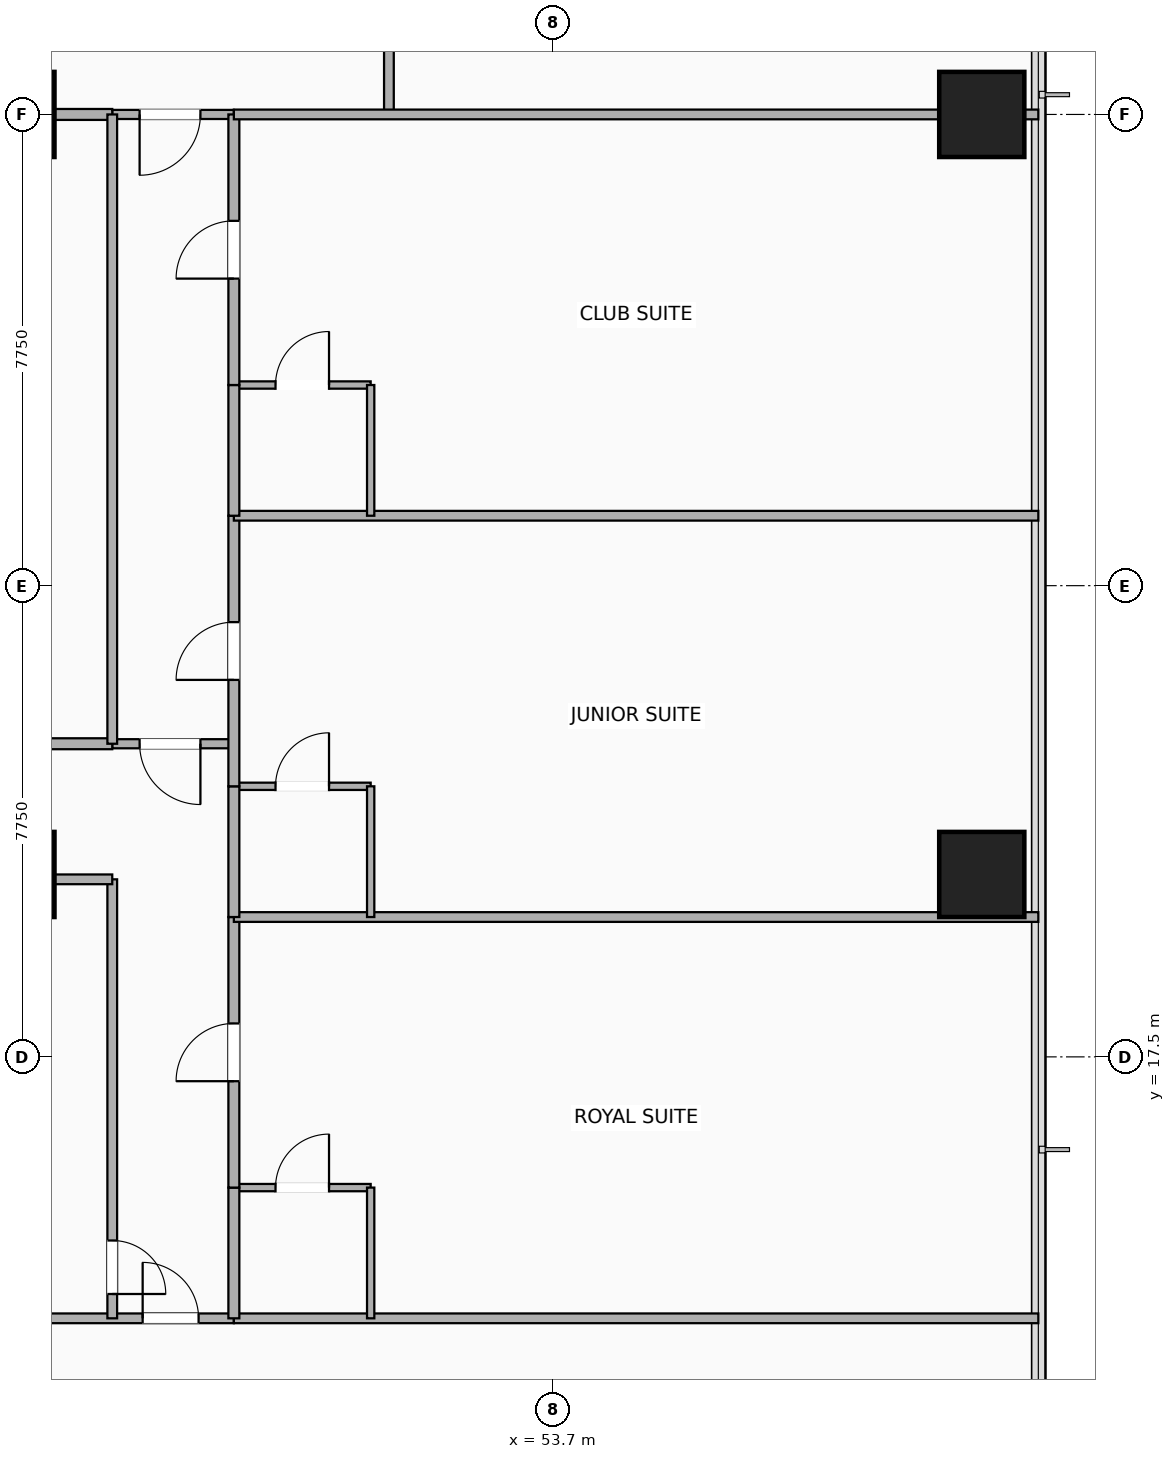
"""IFC4 building model, lengths in metres.
Left out: names, types, materials, properties, quantities, classifications, styles, units other than length and angle.
Written with IfcOpenShell. Run it as: python <this file> out.ifc"""

import sys

from ifc_helpers import new_model, si_unit, direction, frame, frame_2d, origin, origin_2d, place, context, subcontext, project, spatial, rectangle, extrude, element, fill, save


model = new_model("IFC4")
c1 = context("Model", 3, precision=1e-05, world=origin(), true_north=direction((0.0, 1.0)))
c2 = subcontext(c1, "Body", "Model", "MODEL_VIEW")
j1 = project(units=[si_unit("LENGTHUNIT", "METRE"), si_unit("PLANEANGLEUNIT", "RADIAN")], contexts=[c1])
p1 = place(None, origin())
s1 = spatial("IfcSite", under=j1, at=p1, CompositionType="ELEMENT")
p2 = place(p1, origin())
s2 = spatial("IfcBuilding", under=s1, at=p2, CompositionType="ELEMENT")
p3 = place(p2, frame((0.0, 0.0, 64.9)))
s3 = spatial("IfcBuildingStorey", under=s2, at=p3, CompositionType="ELEMENT", Elevation=64.9)
for number, where, z_axis, x_axis in (
    (1, (44.8, 20.5, -0.28), (0.0, 0.0, 1.0), (1.0, 0.0, 0.0)),
    (2, (44.8, 33.0, -0.28), (0.0, 0.0, 1.0), (1.0, 0.0, 0.0)),
    (3, (60.75, 20.5, -0.28), (0.0, 0.0, 1.0), (1.0, 0.0, 0.0)),
    (4, (60.75, 33.0, -0.28), (0.0, 0.0, 1.0), (1.0, 0.0, 0.0)),
):
    element("IfcColumn", number, at=place(p3, frame(where, z_axis=z_axis, x_axis=x_axis)), inside=s3, PredefinedType="COLUMN", context=c2, shape_type="SweptSolid", body=[
        extrude(rectangle(XDim=1.4, YDim=1.4, at=origin_2d()), origin(), (0.0, 0.0, 1.0), 3.5),
    ])
p4 = place(p3, frame((44.8, 13.2, 0.0), z_axis=(0.0, 0.0, 1.0), x_axis=(1.0, 0.0, 0.0)))
e5 = element("IfcWall", 5, at=p4, inside=s3, PredefinedType="PARTITIONING", context=c2, shape_type="SweptSolid", body=[
    extrude(rectangle(XDim=3.65, YDim=0.16, at=frame_2d((1.825, 0.0))), origin(), (0.0, 0.0, 1.0), 2.51),
])
p5 = place(p4, frame((3.07, 0.0, 0.0), z_axis=(0.0, 0.0, 1.0), x_axis=(-1.0, 0.0, 0.0)))
e6 = element("IfcOpeningElement", 6, at=p5, cuts=e5, PredefinedType="OPENING", context=c2, shape_type="SweptSolid", body=[
    extrude(rectangle(XDim=0.92, YDim=2.08, at=frame_2d((0.46, 1.04))), frame((0.0, 0.09, 0.0), z_axis=(0.0, -1.0, 0.0), x_axis=(1.0, 0.0, 0.0)), (0.0, 0.0, 1.0), 0.18),
])
p6 = place(p3, frame((46.45, 13.2, 0.0), z_axis=(0.0, 0.0, 1.0), x_axis=(0.0, 1.0, 0.0)))
e7 = element("IfcWall", 7, at=p6, inside=s3, PredefinedType="PARTITIONING", context=c2, shape_type="SweptSolid", body=[
    extrude(rectangle(XDim=7.22, YDim=0.16, at=frame_2d((3.61, 0.0))), origin(), (0.0, 0.0, 1.0), 2.51),
])
p7 = place(p6, frame((0.4, 0.0, 0.0)))
e8 = element("IfcOpeningElement", 8, at=p7, cuts=e7, PredefinedType="OPENING", context=c2, shape_type="SweptSolid", body=[
    extrude(rectangle(XDim=0.88, YDim=2.08, at=frame_2d((0.44, 1.04))), frame((0.0, 0.09, 0.0), z_axis=(0.0, -1.0, 0.0), x_axis=(1.0, 0.0, 0.0)), (0.0, 0.0, 1.0), 0.18),
])
p8 = place(p3, frame((44.8, 20.42, 0.0), z_axis=(0.0, 0.0, 1.0), x_axis=(1.0, 0.0, 0.0)))
e9 = element("IfcWall", 9, at=p8, inside=s3, PredefinedType="PARTITIONING", context=c2, shape_type="SweptSolid", body=[
    extrude(rectangle(XDim=1.65, YDim=0.16, at=frame_2d((0.825, 0.0))), origin(), (0.0, 0.0, 1.0), 2.51),
])
p9 = place(p3, frame((46.45, 22.65, 0.0), z_axis=(0.0, 0.0, 1.0), x_axis=(1.0, 0.0, 0.0)))
e10 = element("IfcWall", 10, at=p9, inside=s3, PredefinedType="PARTITIONING", context=c2, shape_type="SweptSolid", body=[
    extrude(rectangle(XDim=2.0, YDim=0.15, at=frame_2d((1.0, 0.0))), origin(), (0.0, 0.0, 1.0), 3.22),
])
p10 = place(p9, frame((0.45, 0.0, 0.0)))
e11 = element("IfcOpeningElement", 11, at=p10, cuts=e10, PredefinedType="OPENING", context=c2, shape_type="SweptSolid", body=[
    extrude(rectangle(XDim=1.0, YDim=2.15, at=frame_2d((0.5, 1.075))), frame((0.0, 0.085, 0.0), z_axis=(0.0, -1.0, 0.0), x_axis=(1.0, 0.0, 0.0)), (0.0, 0.0, 1.0), 0.17),
])
p11 = place(p3, frame((46.45, 33.0, 0.0), z_axis=(0.0, 0.0, 1.0), x_axis=(1.0, 0.0, 0.0)))
e12 = element("IfcWall", 12, at=p11, inside=s3, PredefinedType="PARTITIONING", context=c2, shape_type="SweptSolid", body=[
    extrude(rectangle(XDim=2.0, YDim=0.15, at=frame_2d((1.0, 0.0))), origin(), (0.0, 0.0, 1.0), 2.51),
])
p12 = place(p11, frame((0.45, 0.0, 0.0)))
e13 = element("IfcOpeningElement", 13, at=p12, cuts=e12, PredefinedType="OPENING", context=c2, shape_type="SweptSolid", body=[
    extrude(rectangle(XDim=1.0, YDim=2.15, at=frame_2d((0.5, 1.075))), frame((0.0, 0.085, 0.0), z_axis=(0.0, -1.0, 0.0), x_axis=(1.0, 0.0, 0.0)), (0.0, 0.0, 1.0), 0.17),
])
p13 = place(p3, frame((51.0, 33.0, 0.0), z_axis=(0.0, 0.0, 1.0), x_axis=(0.0, 1.0, 0.0)))
e14 = element("IfcWall", 14, at=p13, inside=s3, PredefinedType="PARTITIONING", context=c2, shape_type="SweptSolid", body=[
    extrude(rectangle(XDim=2.05, YDim=0.16, at=frame_2d((1.025, 0.0))), origin(), (0.0, 0.0, 1.0), 2.51),
])
p14 = place(p3, frame((24.1, 22.65, 0.0), z_axis=(0.0, 0.0, 1.0), x_axis=(1.0, 0.0, 0.0)))
e15 = element("IfcWall", 15, at=p14, inside=s3, PredefinedType="PARTITIONING", context=c2, shape_type="SweptSolid", body=[
    extrude(rectangle(XDim=22.35, YDim=0.18, at=frame_2d((11.175, 0.0))), origin(), (0.0, 0.0, 1.0), 2.51),
])
p15 = place(p14, frame((10.7, 0.0, 0.0)))
e16 = element("IfcOpeningElement", 16, at=p15, cuts=e15, PredefinedType="OPENING", context=c2, shape_type="SweptSolid", body=[
    extrude(rectangle(XDim=0.95, YDim=2.15, at=frame_2d((0.475, 1.075))), frame((0.0, 0.1, 0.0), z_axis=(0.0, -1.0, 0.0), x_axis=(1.0, 0.0, 0.0)), (0.0, 0.0, 1.0), 0.2),
])
p16 = place(p3, frame((24.1, 33.0, 0.0), z_axis=(0.0, 0.0, 1.0), x_axis=(1.0, 0.0, 0.0)))
e17 = element("IfcWall", 17, at=p16, inside=s3, PredefinedType="PARTITIONING", context=c2, shape_type="SweptSolid", body=[
    extrude(rectangle(XDim=22.35, YDim=0.18, at=frame_2d((11.175, 0.0))), origin(), (0.0, 0.0, 1.0), 2.51),
])
p17 = place(p3, frame((46.45, 22.65, 0.0), z_axis=(0.0, 0.0, 1.0), x_axis=(0.0, 1.0, 0.0)))
e18 = element("IfcWall", 18, at=p17, inside=s3, PredefinedType="PARTITIONING", context=c2, shape_type="SweptSolid", body=[
    extrude(rectangle(XDim=10.35, YDim=0.16, at=frame_2d((5.175, 0.0))), origin(), (0.0, 0.0, 1.0), 2.51),
])
p18 = place(p3, frame((48.45, 13.2, 0.0), z_axis=(0.0, 0.0, 1.0), x_axis=(1.0, 0.0, 0.0)))
e19 = element("IfcWall", 19, at=p18, inside=s3, PredefinedType="PARTITIONING", context=c2, shape_type="SweptSolid", body=[
    extrude(rectangle(XDim=13.23, YDim=0.16, at=frame_2d((6.615, 0.0))), origin(), (0.0, 0.0, 1.0), 2.583),
])
p19 = place(p3, frame((48.45, 15.35, 0.0), z_axis=(0.0, 0.0, 1.0), x_axis=(1.0, 0.0, 0.0)))
e20 = element("IfcWall", 20, at=p19, inside=s3, PredefinedType="PARTITIONING", context=c2, shape_type="SweptSolid", body=[
    extrude(rectangle(XDim=2.25, YDim=0.12, at=frame_2d((1.125, 0.0))), origin(), (0.0, 0.0, 1.0), 3.22),
])
p20 = place(p19, frame((1.565, 0.0, 0.0), z_axis=(0.0, 0.0, 1.0), x_axis=(-1.0, 0.0, 0.0)))
e21 = element("IfcOpeningElement", 21, at=p20, cuts=e20, PredefinedType="OPENING", context=c2, shape_type="SweptSolid", body=[
    extrude(rectangle(XDim=0.88, YDim=2.08, at=frame_2d((0.44, 1.04))), frame((0.0, 0.07, 0.0), z_axis=(0.0, -1.0, 0.0), x_axis=(1.0, 0.0, 0.0)), (0.0, 0.0, 1.0), 0.14),
])
p21 = place(p3, frame((50.7, 13.2, 0.0), z_axis=(0.0, 0.0, 1.0), x_axis=(0.0, 1.0, 0.0)))
e22 = element("IfcWall", 22, at=p21, inside=s3, PredefinedType="PARTITIONING", context=c2, shape_type="SweptSolid", body=[
    extrude(rectangle(XDim=2.15, YDim=0.12, at=frame_2d((1.075, 0.0))), origin(), (0.0, 0.0, 1.0), 2.902),
])
p22 = place(p3, frame((48.45, 13.2, 0.0), z_axis=(0.0, 0.0, 1.0), x_axis=(0.0, 1.0, 0.0)))
e23 = element("IfcWall", 23, at=p22, inside=s3, PredefinedType="PARTITIONING", context=c2, shape_type="SweptSolid", body=[
    extrude(rectangle(XDim=2.15, YDim=0.18, at=frame_2d((1.075, 0.0))), origin(), (0.0, 0.0, 1.0), 2.902),
])
p23 = place(p3, frame((48.45, 15.35, 0.0), z_axis=(0.0, 0.0, 1.0), x_axis=(0.0, 1.0, 0.0)))
e24 = element("IfcWall", 24, at=p23, inside=s3, PredefinedType="PARTITIONING", context=c2, shape_type="SweptSolid", body=[
    extrude(rectangle(XDim=4.45, YDim=0.18, at=frame_2d((2.225, 0.0))), origin(), (0.0, 0.0, 1.0), 2.902),
])
p24 = place(p23, frame((2.7, 0.0, 0.0), z_axis=(0.0, 0.0, 1.0), x_axis=(-1.0, 0.0, 0.0)))
e25 = element("IfcOpeningElement", 25, at=p24, cuts=e24, PredefinedType="OPENING", context=c2, shape_type="SweptSolid", body=[
    extrude(rectangle(XDim=0.95, YDim=2.15, at=frame_2d((0.475, 1.075))), frame((0.0, 0.1, 0.0), z_axis=(0.0, -1.0, 0.0), x_axis=(1.0, 0.0, 0.0)), (0.0, 0.0, 1.0), 0.2),
])
p25 = place(p3, frame((48.45, 19.8, 0.0), z_axis=(0.0, 0.0, 1.0), x_axis=(1.0, 0.0, 0.0)))
e26 = element("IfcWall", 26, at=p25, inside=s3, PredefinedType="PARTITIONING", context=c2, shape_type="SweptSolid", body=[
    extrude(rectangle(XDim=13.23, YDim=0.16, at=frame_2d((6.615, 0.0))), origin(), (0.0, 0.0, 1.0), 2.583),
])
p26 = place(p3, frame((48.45, 21.95, 0.0), z_axis=(0.0, 0.0, 1.0), x_axis=(1.0, 0.0, 0.0)))
e27 = element("IfcWall", 27, at=p26, inside=s3, PredefinedType="PARTITIONING", context=c2, shape_type="SweptSolid", body=[
    extrude(rectangle(XDim=2.25, YDim=0.12, at=frame_2d((1.125, 0.0))), origin(), (0.0, 0.0, 1.0), 3.22),
])
p27 = place(p26, frame((1.565, 0.0, 0.0), z_axis=(0.0, 0.0, 1.0), x_axis=(-1.0, 0.0, 0.0)))
e28 = element("IfcOpeningElement", 28, at=p27, cuts=e27, PredefinedType="OPENING", context=c2, shape_type="SweptSolid", body=[
    extrude(rectangle(XDim=0.88, YDim=2.08, at=frame_2d((0.44, 1.04))), frame((0.0, 0.07, 0.0), z_axis=(0.0, -1.0, 0.0), x_axis=(1.0, 0.0, 0.0)), (0.0, 0.0, 1.0), 0.14),
])
p28 = place(p3, frame((50.7, 19.8, 0.0), z_axis=(0.0, 0.0, 1.0), x_axis=(0.0, 1.0, 0.0)))
e29 = element("IfcWall", 29, at=p28, inside=s3, PredefinedType="PARTITIONING", context=c2, shape_type="SweptSolid", body=[
    extrude(rectangle(XDim=2.15, YDim=0.12, at=frame_2d((1.075, 0.0))), origin(), (0.0, 0.0, 1.0), 2.51),
])
p29 = place(p3, frame((48.45, 19.8, 0.0), z_axis=(0.0, 0.0, 1.0), x_axis=(0.0, 1.0, 0.0)))
e30 = element("IfcWall", 30, at=p29, inside=s3, PredefinedType="PARTITIONING", context=c2, shape_type="SweptSolid", body=[
    extrude(rectangle(XDim=2.15, YDim=0.18, at=frame_2d((1.075, 0.0))), origin(), (0.0, 0.0, 1.0), 2.51),
])
p30 = place(p3, frame((48.45, 21.95, 0.0), z_axis=(0.0, 0.0, 1.0), x_axis=(0.0, 1.0, 0.0)))
e31 = element("IfcWall", 31, at=p30, inside=s3, PredefinedType="PARTITIONING", context=c2, shape_type="SweptSolid", body=[
    extrude(rectangle(XDim=4.45, YDim=0.18, at=frame_2d((2.225, 0.0))), origin(), (0.0, 0.0, 1.0), 2.788),
])
p31 = place(p30, frame((2.7, 0.0, 0.0), z_axis=(0.0, 0.0, 1.0), x_axis=(-1.0, 0.0, 0.0)))
e32 = element("IfcOpeningElement", 32, at=p31, cuts=e31, PredefinedType="OPENING", context=c2, shape_type="SweptSolid", body=[
    extrude(rectangle(XDim=0.95, YDim=2.15, at=frame_2d((0.475, 1.075))), frame((0.0, 0.1, 0.0), z_axis=(0.0, -1.0, 0.0), x_axis=(1.0, 0.0, 0.0)), (0.0, 0.0, 1.0), 0.2),
])
p32 = place(p3, frame((48.45, 26.4, 0.0), z_axis=(0.0, 0.0, 1.0), x_axis=(1.0, 0.0, 0.0)))
e33 = element("IfcWall", 33, at=p32, inside=s3, PredefinedType="PARTITIONING", context=c2, shape_type="SweptSolid", body=[
    extrude(rectangle(XDim=13.23, YDim=0.16, at=frame_2d((6.615, 0.0))), origin(), (0.0, 0.0, 1.0), 2.583),
])
p33 = place(p3, frame((48.45, 28.55, 0.0), z_axis=(0.0, 0.0, 1.0), x_axis=(1.0, 0.0, 0.0)))
e34 = element("IfcWall", 34, at=p33, inside=s3, PredefinedType="PARTITIONING", context=c2, shape_type="SweptSolid", body=[
    extrude(rectangle(XDim=2.25, YDim=0.12, at=frame_2d((1.125, 0.0))), origin(), (0.0, 0.0, 1.0), 3.22),
])
p34 = place(p33, frame((1.565, 0.0, 0.0), z_axis=(0.0, 0.0, 1.0), x_axis=(-1.0, 0.0, 0.0)))
e35 = element("IfcOpeningElement", 35, at=p34, cuts=e34, PredefinedType="OPENING", context=c2, shape_type="SweptSolid", body=[
    extrude(rectangle(XDim=0.88, YDim=2.08, at=frame_2d((0.44, 1.04))), frame((0.0, 0.07, 0.0), z_axis=(0.0, -1.0, 0.0), x_axis=(1.0, 0.0, 0.0)), (0.0, 0.0, 1.0), 0.14),
])
p35 = place(p3, frame((50.7, 26.4, 0.0), z_axis=(0.0, 0.0, 1.0), x_axis=(0.0, 1.0, 0.0)))
e36 = element("IfcWall", 36, at=p35, inside=s3, PredefinedType="PARTITIONING", context=c2, shape_type="SweptSolid", body=[
    extrude(rectangle(XDim=2.15, YDim=0.12, at=frame_2d((1.075, 0.0))), origin(), (0.0, 0.0, 1.0), 3.22),
])
p36 = place(p3, frame((48.45, 26.4, 0.0), z_axis=(0.0, 0.0, 1.0), x_axis=(0.0, 1.0, 0.0)))
e37 = element("IfcWall", 37, at=p36, inside=s3, PredefinedType="PARTITIONING", context=c2, shape_type="SweptSolid", body=[
    extrude(rectangle(XDim=2.15, YDim=0.18, at=frame_2d((1.075, 0.0))), origin(), (0.0, 0.0, 1.0), 3.22),
])
p37 = place(p3, frame((48.45, 28.55, 0.0), z_axis=(0.0, 0.0, 1.0), x_axis=(0.0, 1.0, 0.0)))
e38 = element("IfcWall", 38, at=p37, inside=s3, PredefinedType="PARTITIONING", context=c2, shape_type="SweptSolid", body=[
    extrude(rectangle(XDim=4.45, YDim=0.18, at=frame_2d((2.225, 0.0))), origin(), (0.0, 0.0, 1.0), 2.51),
])
p38 = place(p37, frame((2.7, 0.0, 0.0), z_axis=(0.0, 0.0, 1.0), x_axis=(-1.0, 0.0, 0.0)))
e39 = element("IfcOpeningElement", 39, at=p38, cuts=e38, PredefinedType="OPENING", context=c2, shape_type="SweptSolid", body=[
    extrude(rectangle(XDim=0.95, YDim=2.15, at=frame_2d((0.475, 1.075))), frame((0.0, 0.1, 0.0), z_axis=(0.0, -1.0, 0.0), x_axis=(1.0, 0.0, 0.0)), (0.0, 0.0, 1.0), 0.2),
])
p39 = place(p3, frame((48.45, 33.0, 0.0), z_axis=(0.0, 0.0, 1.0), x_axis=(1.0, 0.0, 0.0)))
e40 = element("IfcWall", 40, at=p39, inside=s3, PredefinedType="PARTITIONING", context=c2, shape_type="SweptSolid", body=[
    extrude(rectangle(XDim=13.23, YDim=0.16, at=frame_2d((6.615, 0.0))), origin(), (0.0, 0.0, 1.0), 2.51),
])
p40 = place(p5, origin())
e41 = element("IfcDoor", 41, at=p40, inside=s3, OperationType="SINGLE_SWING_LEFT", PredefinedType="DOOR", context=c2, shape_type="SweptSolid", body=[
    extrude(rectangle(XDim=0.92, YDim=2.08, at=frame_2d((0.46, 1.04))), frame((0.0, 0.025, 0.0), z_axis=(0.0, -1.0, 0.0), x_axis=(1.0, 0.0, 0.0)), (0.0, 0.0, 1.0), 0.05),
])
fill(e6, e41)
p41 = place(p7, origin())
e42 = element("IfcDoor", 42, at=p41, inside=s3, OperationType="SINGLE_SWING_LEFT", PredefinedType="DOOR", context=c2, shape_type="SweptSolid", body=[
    extrude(rectangle(XDim=0.88, YDim=2.08, at=frame_2d((0.44, 1.04))), frame((0.0, 0.025, 0.0), z_axis=(0.0, -1.0, 0.0), x_axis=(1.0, 0.0, 0.0)), (0.0, 0.0, 1.0), 0.05),
])
fill(e8, e42)
p42 = place(p10, origin())
e43 = element("IfcDoor", 43, at=p42, inside=s3, OperationType="SINGLE_SWING_RIGHT", PredefinedType="DOOR", context=c2, shape_type="SweptSolid", body=[
    extrude(rectangle(XDim=1.0, YDim=2.15, at=frame_2d((0.5, 1.075))), frame((0.0, 0.025, 0.0), z_axis=(0.0, -1.0, 0.0), x_axis=(1.0, 0.0, 0.0)), (0.0, 0.0, 1.0), 0.05),
])
fill(e11, e43)
p43 = place(p12, origin())
e44 = element("IfcDoor", 44, at=p43, inside=s3, OperationType="SINGLE_SWING_LEFT", PredefinedType="DOOR", context=c2, shape_type="SweptSolid", body=[
    extrude(rectangle(XDim=1.0, YDim=2.15, at=frame_2d((0.5, 1.075))), frame((0.0, 0.025, 0.0), z_axis=(0.0, -1.0, 0.0), x_axis=(1.0, 0.0, 0.0)), (0.0, 0.0, 1.0), 0.05),
])
fill(e13, e44)
p44 = place(p20, origin())
e45 = element("IfcDoor", 45, at=p44, inside=s3, OperationType="SINGLE_SWING_RIGHT", PredefinedType="DOOR", context=c2, shape_type="SweptSolid", body=[
    extrude(rectangle(XDim=0.88, YDim=2.08, at=frame_2d((0.44, 1.04))), frame((0.0, 0.025, 0.0), z_axis=(0.0, -1.0, 0.0), x_axis=(1.0, 0.0, 0.0)), (0.0, 0.0, 1.0), 0.05),
])
fill(e21, e45)
p45 = place(p24, origin())
e46 = element("IfcDoor", 46, at=p45, inside=s3, OperationType="SINGLE_SWING_LEFT", PredefinedType="DOOR", context=c2, shape_type="SweptSolid", body=[
    extrude(rectangle(XDim=0.95, YDim=2.15, at=frame_2d((0.475, 1.075))), frame((0.0, 0.025, 0.0), z_axis=(0.0, -1.0, 0.0), x_axis=(1.0, 0.0, 0.0)), (0.0, 0.0, 1.0), 0.05),
])
fill(e25, e46)
p46 = place(p27, origin())
e47 = element("IfcDoor", 47, at=p46, inside=s3, OperationType="SINGLE_SWING_RIGHT", PredefinedType="DOOR", context=c2, shape_type="SweptSolid", body=[
    extrude(rectangle(XDim=0.88, YDim=2.08, at=frame_2d((0.44, 1.04))), frame((0.0, 0.025, 0.0), z_axis=(0.0, -1.0, 0.0), x_axis=(1.0, 0.0, 0.0)), (0.0, 0.0, 1.0), 0.05),
])
fill(e28, e47)
p47 = place(p31, origin())
e48 = element("IfcDoor", 48, at=p47, inside=s3, OperationType="SINGLE_SWING_LEFT", PredefinedType="DOOR", context=c2, shape_type="SweptSolid", body=[
    extrude(rectangle(XDim=0.95, YDim=2.15, at=frame_2d((0.475, 1.075))), frame((0.0, 0.025, 0.0), z_axis=(0.0, -1.0, 0.0), x_axis=(1.0, 0.0, 0.0)), (0.0, 0.0, 1.0), 0.05),
])
fill(e32, e48)
p48 = place(p34, origin())
e49 = element("IfcDoor", 49, at=p48, inside=s3, OperationType="SINGLE_SWING_RIGHT", PredefinedType="DOOR", context=c2, shape_type="SweptSolid", body=[
    extrude(rectangle(XDim=0.88, YDim=2.08, at=frame_2d((0.44, 1.04))), frame((0.0, 0.025, 0.0), z_axis=(0.0, -1.0, 0.0), x_axis=(1.0, 0.0, 0.0)), (0.0, 0.0, 1.0), 0.05),
])
fill(e35, e49)
p49 = place(p38, origin())
e50 = element("IfcDoor", 50, at=p49, inside=s3, OperationType="SINGLE_SWING_LEFT", PredefinedType="DOOR", context=c2, shape_type="SweptSolid", body=[
    extrude(rectangle(XDim=0.95, YDim=2.15, at=frame_2d((0.475, 1.075))), frame((0.0, 0.025, 0.0), z_axis=(0.0, -1.0, 0.0), x_axis=(1.0, 0.0, 0.0)), (0.0, 0.0, 1.0), 0.05),
])
fill(e39, e50)
save(model, sys.argv[1])
